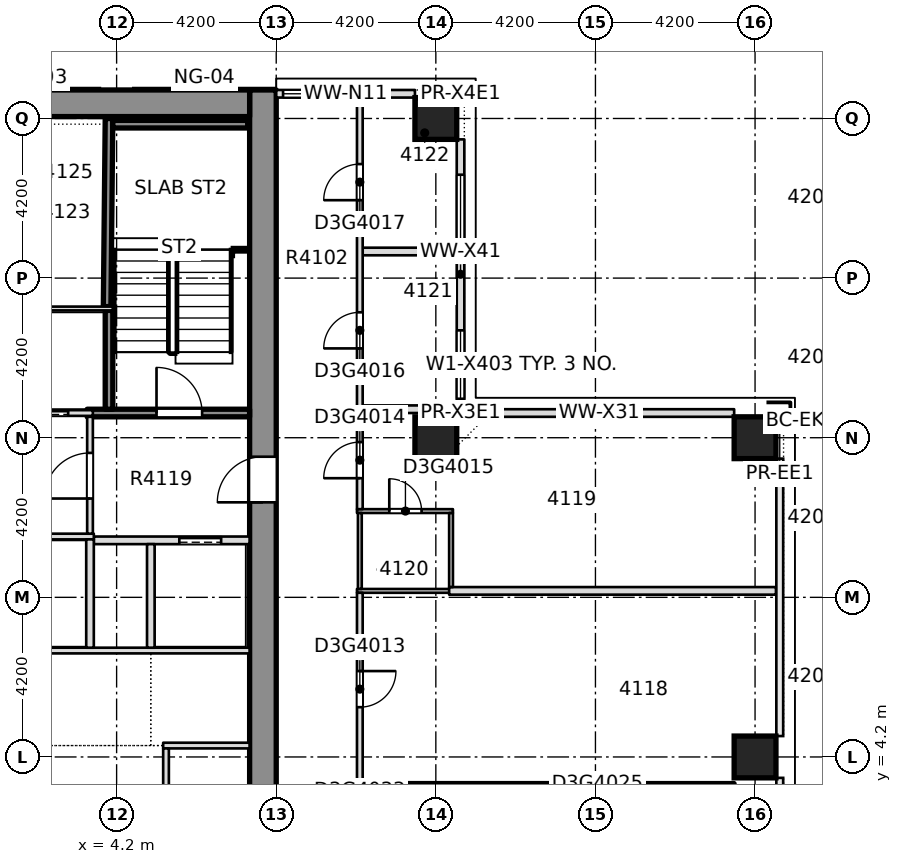
"""IFC4 building model, lengths in metres.
Left out: names, types, materials, properties, quantities, classifications, styles, units other than length and angle.
Written with IfcOpenShell. Run it as: python <this file> out.ifc"""

import sys

from ifc_helpers import new_model, si_unit, direction, frame, frame_2d, origin, origin_2d, place, context, subcontext, project, spatial, rectangle, extrude, element, fill, save


model = new_model("IFC4")
c1 = context("Model", 3, precision=1e-05, world=origin(), true_north=direction((0.0, 1.0)))
c2 = subcontext(c1, "Body", "Model", "MODEL_VIEW")
j1 = project(units=[si_unit("LENGTHUNIT", "METRE"), si_unit("PLANEANGLEUNIT", "RADIAN")], contexts=[c1])
p1 = place(None, origin())
s1 = spatial("IfcSite", under=j1, at=p1, CompositionType="ELEMENT")
p2 = place(p1, origin())
s2 = spatial("IfcBuilding", under=s1, at=p2, CompositionType="ELEMENT")
p3 = place(p2, frame((0.0, 0.0, 160.7)))
s3 = spatial("IfcBuildingStorey", under=s2, at=p3, CompositionType="ELEMENT", Elevation=160.7)
p4 = place(p3, frame((8.05, -8.4, -0.4), z_axis=(0.0, 0.0, 1.0), x_axis=(0.0, 1.0, 0.0)))
e1 = element("IfcWall", 1, at=p4, inside=s3, PredefinedType="SOLIDWALL", context=c2, shape_type="SweptSolid", body=[
    extrude(rectangle(XDim=30.15, YDim=0.7, at=frame_2d((15.075, 0.0))), origin(), (0.0, 0.0, 1.0), 3.45),
])
p5 = place(p4, frame((19.3, 0.0, 0.4)))
e2 = element("IfcOpeningElement", 2, at=p5, cuts=e1, PredefinedType="OPENING", context=c2, shape_type="SweptSolid", body=[
    extrude(rectangle(XDim=1.2, YDim=2.1, at=frame_2d((0.6, 1.05))), frame((0.0, 0.36, 0.0), z_axis=(0.0, -1.0, 0.0), x_axis=(1.0, 0.0, 0.0)), (0.0, 0.0, 1.0), 0.72),
])
p6 = place(p3, frame((-7.7, 21.4, -0.4), z_axis=(0.0, 0.0, 1.0), x_axis=(1.0, 0.0, 0.0)))
e3 = element("IfcWall", 3, at=p6, inside=s3, PredefinedType="SHEAR", context=c2, shape_type="SweptSolid", body=[
    extrude(rectangle(XDim=15.4, YDim=0.7, at=frame_2d((7.7, 0.0))), origin(), (0.0, 0.0, 1.0), 3.45),
])
for number, where, z_axis, x_axis in (
    (4, (21.0, 4.2, -0.4), (0.0, 0.0, 1.0), (1.0, 0.0, 0.0)),
    (5, (12.6, 12.6, -0.4), (0.0, 0.0, 1.0), (1.0, 0.0, 0.0)),
    (6, (21.0, 12.6, -0.4), (0.0, 0.0, 1.0), (1.0, 0.0, 0.0)),
    (7, (12.6, 21.0, -0.4), (0.0, 0.0, 1.0), (1.0, 0.0, 0.0)),
):
    element("IfcColumn", number, at=place(p3, frame(where, z_axis=z_axis, x_axis=x_axis)), inside=s3, PredefinedType="COLUMN", context=c2, shape_type="SweptSolid", body=[
        extrude(rectangle(XDim=1.1, YDim=1.1, at=origin_2d()), origin(), (0.0, 0.0, 1.0), 3.45),
    ])
p7 = place(p3, frame((10.525, 8.57, 0.0), z_axis=(0.0, 0.0, 1.0), x_axis=(1.0, 0.0, 0.0)))
e8 = element("IfcWall", 8, at=p7, inside=s3, PredefinedType="PARTITIONING", context=c2, shape_type="SweptSolid", body=[
    extrude(rectangle(XDim=2.525, YDim=0.1, at=frame_2d((1.263, 0.0))), origin(), (0.0, 0.0, 1.0), 3.05),
])
p8 = place(p3, frame((12.95, 8.57, 0.0), z_axis=(0.0, 0.0, 1.0), x_axis=(1.0, 0.0, 0.0)))
e9 = element("IfcWall", 9, at=p8, inside=s3, PredefinedType="PARTITIONING", context=c2, shape_type="SweptSolid", body=[
    extrude(rectangle(XDim=8.6, YDim=0.2, at=frame_2d((4.3, 0.0))), origin(), (0.0, 0.0, 1.0), 3.05),
])
p9 = place(p3, frame((10.525, 10.67, 0.0), z_axis=(0.0, 0.0, 1.0), x_axis=(1.0, 0.0, 0.0)))
e10 = element("IfcWall", 10, at=p9, inside=s3, PredefinedType="PARTITIONING", context=c2, shape_type="SweptSolid", body=[
    extrude(rectangle(XDim=2.525, YDim=0.1, at=frame_2d((1.263, 0.0))), origin(), (0.0, 0.0, 1.0), 3.05),
])
p10 = place(p9, frame((0.85, 0.0, 0.0)))
e11 = element("IfcOpeningElement", 11, at=p10, cuts=e10, PredefinedType="OPENING", context=c2, shape_type="SweptSolid", body=[
    extrude(rectangle(XDim=0.85, YDim=2.1, at=frame_2d((0.425, 1.05))), frame((0.0, 0.06, 0.0), z_axis=(0.0, -1.0, 0.0), x_axis=(1.0, 0.0, 0.0)), (0.0, 0.0, 1.0), 0.12),
])
for number, where, z_axis, x_axis in (
    (12, (10.675, 13.35, 0.0), (0.0, 0.0, 1.0), (1.0, 0.0, 0.0)),
    (13, (10.675, 17.5, 0.0), (0.0, 0.0, 1.0), (1.0, 0.0, 0.0)),
):
    element("IfcWall", number, at=place(p3, frame(where, z_axis=z_axis, x_axis=x_axis)), inside=s3, PredefinedType="PARTITIONING", context=c2, shape_type="SweptSolid", body=[
        extrude(rectangle(XDim=2.475, YDim=0.2, at=frame_2d((1.237, 0.0))), origin(), (0.0, 0.0, 1.0), 3.05),
    ])
p11 = place(p3, frame((10.6, -6.225, 0.0), z_axis=(0.0, 0.0, 1.0), x_axis=(0.0, 1.0, 0.0)))
e14 = element("IfcWall", 14, at=p11, inside=s3, PredefinedType="PARTITIONING", context=c2, shape_type="SweptSolid", body=[
    extrude(rectangle(XDim=14.745, YDim=0.15, at=frame_2d((7.373, 0.0))), origin(), (0.0, 0.0, 1.0), 3.05),
])
p12 = place(p11, frame((11.735, 0.0, 0.0)))
e15 = element("IfcOpeningElement", 15, at=p12, cuts=e14, PredefinedType="OPENING", context=c2, shape_type="SweptSolid", body=[
    extrude(rectangle(XDim=0.95, YDim=2.1, at=frame_2d((0.475, 1.05))), frame((0.0, 0.085, 0.0), z_axis=(0.0, -1.0, 0.0), x_axis=(1.0, 0.0, 0.0)), (0.0, 0.0, 1.0), 0.17),
])
p13 = place(p11, frame((5.675, 0.0, 0.0)))
e16 = element("IfcOpeningElement", 16, at=p13, cuts=e14, PredefinedType="OPENING", context=c2, shape_type="SweptSolid", body=[
    extrude(rectangle(XDim=1.1, YDim=2.1, at=frame_2d((0.55, 1.05))), frame((0.0, 0.085, 0.0), z_axis=(0.0, -1.0, 0.0), x_axis=(1.0, 0.0, 0.0)), (0.0, 0.0, 1.0), 0.17),
])
p14 = place(p11, frame((7.925, 0.0, 0.0)))
e17 = element("IfcOpeningElement", 17, at=p14, cuts=e14, PredefinedType="OPENING", context=c2, shape_type="SweptSolid", body=[
    extrude(rectangle(XDim=1.0, YDim=2.1, at=frame_2d((0.5, 1.05))), frame((0.0, 0.085, 0.0), z_axis=(0.0, -1.0, 0.0), x_axis=(1.0, 0.0, 0.0)), (0.0, 0.0, 1.0), 0.17),
])
p15 = place(p3, frame((10.6, 8.62, 0.0), z_axis=(0.0, 0.0, 1.0), x_axis=(0.0, 1.0, 0.0)))
e18 = element("IfcWall", 18, at=p15, inside=s3, PredefinedType="PARTITIONING", context=c2, shape_type="SweptSolid", body=[
    extrude(rectangle(XDim=2.0, YDim=0.1, at=frame_2d((1.0, 0.0))), origin(), (0.0, 0.0, 1.0), 3.05),
])
p16 = place(p3, frame((10.6, 10.72, 0.0), z_axis=(0.0, 0.0, 1.0), x_axis=(0.0, 1.0, 0.0)))
e19 = element("IfcWall", 19, at=p16, inside=s3, PredefinedType="PARTITIONING", context=c2, shape_type="SweptSolid", body=[
    extrude(rectangle(XDim=10.83, YDim=0.15, at=frame_2d((5.415, 0.0))), origin(), (0.0, 0.0, 1.0), 3.05),
])
p17 = place(p16, frame((0.815, 0.0, 0.0)))
e20 = element("IfcOpeningElement", 20, at=p17, cuts=e19, PredefinedType="OPENING", context=c2, shape_type="SweptSolid", body=[
    extrude(rectangle(XDim=0.95, YDim=2.1, at=frame_2d((0.475, 1.05))), frame((0.0, 0.085, 0.0), z_axis=(0.0, -1.0, 0.0), x_axis=(1.0, 0.0, 0.0)), (0.0, 0.0, 1.0), 0.17),
])
p18 = place(p16, frame((4.23, 0.0, 0.0)))
e21 = element("IfcOpeningElement", 21, at=p18, cuts=e19, PredefinedType="OPENING", context=c2, shape_type="SweptSolid", body=[
    extrude(rectangle(XDim=0.95, YDim=2.1, at=frame_2d((0.475, 1.05))), frame((0.0, 0.085, 0.0), z_axis=(0.0, -1.0, 0.0), x_axis=(1.0, 0.0, 0.0)), (0.0, 0.0, 1.0), 0.17),
])
p19 = place(p16, frame((8.13, 0.0, 0.0)))
e22 = element("IfcOpeningElement", 22, at=p19, cuts=e19, PredefinedType="OPENING", context=c2, shape_type="SweptSolid", body=[
    extrude(rectangle(XDim=0.95, YDim=2.1, at=frame_2d((0.475, 1.05))), frame((0.0, 0.085, 0.0), z_axis=(0.0, -1.0, 0.0), x_axis=(1.0, 0.0, 0.0)), (0.0, 0.0, 1.0), 0.17),
])
p20 = place(p3, frame((13.0, 8.67, 0.0), z_axis=(0.0, 0.0, 1.0), x_axis=(0.0, 1.0, 0.0)))
e23 = element("IfcWall", 23, at=p20, inside=s3, PredefinedType="PARTITIONING", context=c2, shape_type="SweptSolid", body=[
    extrude(rectangle(XDim=1.95, YDim=0.1, at=frame_2d((0.975, 0.0))), origin(), (0.0, 0.0, 1.0), 3.05),
])
p21 = place(p3, frame((20.45, 13.25, 0.0), z_axis=(0.0, 0.0, 1.0), x_axis=(-1.0, 0.0, 0.0)))
e24 = element("IfcWall", 24, at=p21, inside=s3, PredefinedType="STANDARD", context=c2, shape_type="SweptSolid", body=[
    extrude(rectangle(XDim=7.1, YDim=0.2, at=frame_2d((3.55, 0.0))), origin(), (0.0, 0.0, 1.0), 3.05),
])
p22 = place(p3, frame((13.25, 13.35, 0.0), z_axis=(0.0, 0.0, 1.0), x_axis=(0.0, 1.0, 0.0)))
e25 = element("IfcWall", 25, at=p22, inside=s3, PredefinedType="STANDARD", context=c2, shape_type="SweptSolid", body=[
    extrude(rectangle(XDim=7.1, YDim=0.2, at=frame_2d((3.55, 0.0))), origin(), (0.0, 0.0, 1.0), 3.05),
])
p23 = place(p22, frame((0.275, 0.0, 0.2)))
e26 = element("IfcOpeningElement", 26, at=p23, cuts=e25, PredefinedType="OPENING", context=c2, shape_type="SweptSolid", body=[
    extrude(rectangle(XDim=1.8, YDim=2.65, at=frame_2d((0.9, 1.325))), frame((0.0, 0.11, 0.0), z_axis=(0.0, -1.0, 0.0), x_axis=(1.0, 0.0, 0.0)), (0.0, 0.0, 1.0), 0.22),
])
p24 = place(p22, frame((4.37, 0.0, 0.2)))
e27 = element("IfcOpeningElement", 27, at=p24, cuts=e25, PredefinedType="OPENING", context=c2, shape_type="SweptSolid", body=[
    extrude(rectangle(XDim=1.8, YDim=2.65, at=frame_2d((0.9, 1.325))), frame((0.0, 0.11, 0.0), z_axis=(0.0, -1.0, 0.0), x_axis=(1.0, 0.0, 0.0)), (0.0, 0.0, 1.0), 0.22),
])
p25 = place(p3, frame((12.05, 21.65, 0.0), z_axis=(0.0, 0.0, 1.0), x_axis=(-1.0, 0.0, 0.0)))
e28 = element("IfcWall", 28, at=p25, inside=s3, PredefinedType="STANDARD", context=c2, shape_type="SweptSolid", body=[
    extrude(rectangle(XDim=3.65, YDim=0.2, at=frame_2d((1.825, 0.0))), origin(), (0.0, 0.0, 1.0), 3.05),
])
p26 = place(p25, frame((1.67, 0.0, 0.2)))
e29 = element("IfcOpeningElement", 29, at=p26, cuts=e28, PredefinedType="OPENING", context=c2, shape_type="SweptSolid", body=[
    extrude(rectangle(XDim=1.8, YDim=2.65, at=frame_2d((0.9, 1.325))), frame((0.0, 0.11, 0.0), z_axis=(0.0, -1.0, 0.0), x_axis=(1.0, 0.0, 0.0)), (0.0, 0.0, 1.0), 0.22),
])
p27 = place(p3, frame((5.425, 4.5, 0.0), z_axis=(0.0, 0.0, 1.0), x_axis=(1.0, 0.0, 0.0)))
e30 = element("IfcWall", 30, at=p27, inside=s3, PredefinedType="PARTITIONING", context=c2, shape_type="SweptSolid", body=[
    extrude(rectangle(XDim=2.274, YDim=0.15, at=frame_2d((1.137, 0.0))), origin(), (0.0, 0.0, 1.0), 3.05),
])
p28 = place(p3, frame((-7.699, 7.0, 0.0), z_axis=(0.0, 0.0, 1.0), x_axis=(1.0, 0.0, 0.0)))
e31 = element("IfcWall", 31, at=p28, inside=s3, PredefinedType="PARTITIONING", context=c2, shape_type="SweptSolid", body=[
    extrude(rectangle(XDim=15.398, YDim=0.15, at=frame_2d((7.699, 0.0))), origin(), (0.0, 0.0, 1.0), 3.05),
])
p29 = place(p28, frame((6.999, 0.0, 0.0)))
e32 = element("IfcOpeningElement", 32, at=p29, cuts=e31, PredefinedType="OPENING", context=c2, shape_type="SweptSolid", body=[
    extrude(rectangle(XDim=1.4, YDim=2.1, at=frame_2d((0.7, 1.05))), frame((0.0, 0.085, 0.0), z_axis=(0.0, -1.0, 0.0), x_axis=(1.0, 0.0, 0.0)), (0.0, 0.0, 1.0), 0.17),
])
p30 = place(p3, frame((3.6, 9.9, 0.0), z_axis=(0.0, 0.0, 1.0), x_axis=(1.0, 0.0, 0.0)))
e33 = element("IfcWall", 33, at=p30, inside=s3, PredefinedType="PARTITIONING", context=c2, shape_type="SweptSolid", body=[
    extrude(rectangle(XDim=4.099, YDim=0.2, at=frame_2d((2.049, 0.0))), origin(), (0.0, 0.0, 1.0), 3.05),
])
p31 = place(p30, frame((2.25, 0.0, 0.0)))
e34 = element("IfcOpeningElement", 34, at=p31, cuts=e33, PredefinedType="OPENING", context=c2, shape_type="SweptSolid", body=[
    extrude(rectangle(XDim=1.1, YDim=2.1, at=frame_2d((0.55, 1.05))), frame((0.0, 0.11, 0.0), z_axis=(0.0, -1.0, 0.0), x_axis=(1.0, 0.0, 0.0)), (0.0, 0.0, 1.0), 0.22),
])
p32 = place(p3, frame((-3.6, 10.0, 0.0), z_axis=(0.0, 0.0, 1.0), x_axis=(1.0, 0.0, 0.0)))
e35 = element("IfcWall", 35, at=p32, inside=s3, PredefinedType="PARTITIONING", context=c2, shape_type="SweptSolid", body=[
    extrude(rectangle(XDim=7.2, YDim=0.15, at=frame_2d((3.6, 0.0))), origin(), (0.0, 0.0, 1.0), 3.05),
])
p33 = place(p32, frame((2.9, 0.0, 0.0)))
e36 = element("IfcOpeningElement", 36, at=p33, cuts=e35, PredefinedType="OPENING", context=c2, shape_type="SweptSolid", body=[
    extrude(rectangle(XDim=1.4, YDim=2.1, at=frame_2d((0.7, 1.05))), frame((0.0, 0.085, 0.0), z_axis=(0.0, -1.0, 0.0), x_axis=(1.0, 0.0, 0.0)), (0.0, 0.0, 1.0), 0.17),
])
p34 = place(p3, frame((-3.575, 13.25, 0.0), z_axis=(0.0, 0.0, 1.0), x_axis=(1.0, 0.0, 0.0)))
e37 = element("IfcWall", 37, at=p34, inside=s3, PredefinedType="PARTITIONING", context=c2, shape_type="SweptSolid", body=[
    extrude(rectangle(XDim=7.15, YDim=0.15, at=frame_2d((3.575, 0.0))), origin(), (0.0, 0.0, 1.0), 3.05),
])
p35 = place(p34, frame((0.6, 0.0, 0.0)))
e38 = element("IfcOpeningElement", 38, at=p35, cuts=e37, PredefinedType="OPENING", context=c2, shape_type="SweptSolid", body=[
    extrude(rectangle(XDim=1.2, YDim=2.1, at=frame_2d((0.6, 1.05))), frame((0.0, 0.085, 0.0), z_axis=(0.0, -1.0, 0.0), x_axis=(1.0, 0.0, 0.0)), (0.0, 0.0, 1.0), 0.17),
])
p36 = place(p34, frame((5.4, 0.0, 0.0)))
e39 = element("IfcOpeningElement", 39, at=p36, cuts=e37, PredefinedType="OPENING", context=c2, shape_type="SweptSolid", body=[
    extrude(rectangle(XDim=1.1, YDim=2.1, at=frame_2d((0.55, 1.05))), frame((0.0, 0.085, 0.0), z_axis=(0.0, -1.0, 0.0), x_axis=(1.0, 0.0, 0.0)), (0.0, 0.0, 1.0), 0.17),
])
p37 = place(p34, frame((2.975, 0.0, 0.0)))
e40 = element("IfcOpeningElement", 40, at=p37, cuts=e37, PredefinedType="OPENING", context=c2, shape_type="SweptSolid", body=[
    extrude(rectangle(XDim=1.2, YDim=2.1, at=frame_2d((0.6, 1.05))), frame((0.0, 0.085, 0.0), z_axis=(0.0, -1.0, 0.0), x_axis=(1.0, 0.0, 0.0)), (0.0, 0.0, 1.0), 0.17),
])
p38 = place(p3, frame((3.425, 13.25, 0.0), z_axis=(0.0, 0.0, 1.0), x_axis=(1.0, 0.0, 0.0)))
e41 = element("IfcWall", 41, at=p38, inside=s3, PredefinedType="SOLIDWALL", context=c2, shape_type="SweptSolid", body=[
    extrude(rectangle(XDim=4.274, YDim=0.2, at=frame_2d((2.137, 0.0))), origin(), (0.0, 0.0, 1.0), 3.05),
])
p39 = place(p38, frame((1.825, 0.0, 0.0)))
e42 = element("IfcOpeningElement", 42, at=p39, cuts=e41, PredefinedType="OPENING", context=c2, shape_type="SweptSolid", body=[
    extrude(rectangle(XDim=1.2, YDim=2.1, at=frame_2d((0.6, 1.05))), frame((0.0, 0.11, 0.0), z_axis=(0.0, -1.0, 0.0), x_axis=(1.0, 0.0, 0.0)), (0.0, 0.0, 1.0), 0.22),
])
p40 = place(p3, frame((0.65, 16.0, 0.0), z_axis=(0.0, 0.0, 1.0), x_axis=(1.0, 0.0, 0.0)))
e43 = element("IfcWall", 43, at=p40, inside=s3, PredefinedType="PARTITIONING", context=c2, shape_type="SweptSolid", body=[
    extrude(rectangle(XDim=3.45, YDim=0.1, at=frame_2d((1.725, 0.0))), origin(), (0.0, 0.0, 1.0), 3.05),
])
p41 = place(p3, frame((3.5, 7.075, 0.0), z_axis=(0.0, 0.0, 1.0), x_axis=(0.0, 1.0, 0.0)))
e44 = element("IfcWall", 44, at=p41, inside=s3, PredefinedType="PARTITIONING", context=c2, shape_type="SweptSolid", body=[
    extrude(rectangle(XDim=2.85, YDim=0.2, at=frame_2d((1.425, 0.0))), origin(), (0.0, 0.0, 1.0), 3.05),
])
p42 = place(p3, frame((3.5, 10.075, 0.0), z_axis=(0.0, 0.0, 1.0), x_axis=(0.0, 1.0, 0.0)))
e45 = element("IfcWall", 45, at=p42, inside=s3, PredefinedType="PARTITIONING", context=c2, shape_type="SweptSolid", body=[
    extrude(rectangle(XDim=3.075, YDim=0.15, at=frame_2d((1.538, 0.0))), origin(), (0.0, 0.0, 1.0), 3.05),
])
p43 = place(p42, frame((0.925, 0.0, 0.0)))
e46 = element("IfcOpeningElement", 46, at=p43, cuts=e45, PredefinedType="OPENING", context=c2, shape_type="SweptSolid", body=[
    extrude(rectangle(XDim=1.2, YDim=2.1, at=frame_2d((0.6, 1.05))), frame((0.0, 0.085, 0.0), z_axis=(0.0, -1.0, 0.0), x_axis=(1.0, 0.0, 0.0)), (0.0, 0.0, 1.0), 0.17),
])
p44 = place(p3, frame((4.0, 13.35, 0.0), z_axis=(0.0, 0.0, 1.0), x_axis=(0.0, 1.0, 0.0)))
e47 = element("IfcWall", 47, at=p44, inside=s3, PredefinedType="SOLIDWALL", context=c2, shape_type="SweptSolid", body=[
    extrude(rectangle(XDim=2.6, YDim=0.2, at=frame_2d((1.3, 0.0))), origin(), (0.0, 0.0, 1.0), 3.05),
])
p45 = place(p3, frame((3.95, 16.05, 0.0), z_axis=(0.0, 0.0, 1.0), x_axis=(0.010112452169, 0.999948867848, 0.0)))
e48 = element("IfcWall", 48, at=p45, inside=s3, PredefinedType="SOLIDWALL", context=c2, shape_type="SweptSolid", body=[
    extrude(rectangle(XDim=4.949, YDim=0.2, at=frame_2d((2.475, 0.0))), origin(), (0.0, 0.0, 1.0), 3.05),
])
p46 = place(p3, frame((5.1, 7.075, 0.0), z_axis=(0.0, 0.0, 1.0), x_axis=(0.0, 1.0, 0.0)))
e49 = element("IfcWall", 49, at=p46, inside=s3, PredefinedType="PARTITIONING", context=c2, shape_type="SweptSolid", body=[
    extrude(rectangle(XDim=2.725, YDim=0.2, at=frame_2d((1.363, 0.0))), origin(), (0.0, 0.0, 1.0), 3.05),
])
p47 = place(p3, frame((5.5, -7.699, 0.0), z_axis=(0.0, 0.0, 1.0), x_axis=(0.0, 1.0, 0.0)))
e50 = element("IfcWall", 50, at=p47, inside=s3, PredefinedType="PARTITIONING", context=c2, shape_type="SweptSolid", body=[
    extrude(rectangle(XDim=12.124, YDim=0.15, at=frame_2d((6.062, 0.0))), origin(), (0.0, 0.0, 1.0), 3.05),
])
p48 = place(p47, frame((5.724, 0.0, 0.0)))
e51 = element("IfcOpeningElement", 51, at=p48, cuts=e50, PredefinedType="OPENING", context=c2, shape_type="SweptSolid", body=[
    extrude(rectangle(XDim=0.95, YDim=2.1, at=frame_2d((0.475, 1.05))), frame((0.0, 0.085, 0.0), z_axis=(0.0, -1.0, 0.0), x_axis=(1.0, 0.0, 0.0)), (0.0, 0.0, 1.0), 0.17),
])
p49 = place(p3, frame((4.1, 20.85, 0.0), z_axis=(0.0, 0.0, 1.0), x_axis=(1.0, 0.0, 0.0)))
e52 = element("IfcWall", 52, at=p49, inside=s3, PredefinedType="SOLIDWALL", context=c2, shape_type="SweptSolid", body=[
    extrude(rectangle(XDim=3.55, YDim=0.2, at=frame_2d((1.775, 0.0))), origin(), (0.0, 0.0, 1.0), 3.05),
])
p50 = place(p12, origin())
e53 = element("IfcDoor", 53, at=p50, inside=s3, OperationType="SINGLE_SWING_LEFT", PredefinedType="DOOR", context=c2, shape_type="SweptSolid", body=[
    extrude(rectangle(XDim=0.95, YDim=2.1, at=frame_2d((0.475, 1.05))), frame((0.0, 0.025, 0.0), z_axis=(0.0, -1.0, 0.0), x_axis=(1.0, 0.0, 0.0)), (0.0, 0.0, 1.0), 0.05),
])
fill(e15, e53)
p51 = place(p17, origin())
e54 = element("IfcDoor", 54, at=p51, inside=s3, OperationType="SINGLE_SWING_RIGHT", PredefinedType="DOOR", context=c2, shape_type="SweptSolid", body=[
    extrude(rectangle(XDim=0.95, YDim=2.1, at=frame_2d((0.475, 1.05))), frame((0.0, 0.025, 0.0), z_axis=(0.0, -1.0, 0.0), x_axis=(1.0, 0.0, 0.0)), (0.0, 0.0, 1.0), 0.05),
])
fill(e20, e54)
p52 = place(p10, origin())
e55 = element("IfcDoor", 55, at=p52, inside=s3, OperationType="SINGLE_SWING_RIGHT", PredefinedType="DOOR", context=c2, shape_type="SweptSolid", body=[
    extrude(rectangle(XDim=0.85, YDim=2.1, at=frame_2d((0.425, 1.05))), frame((0.0, 0.025, 0.0), z_axis=(0.0, -1.0, 0.0), x_axis=(1.0, 0.0, 0.0)), (0.0, 0.0, 1.0), 0.05),
])
fill(e11, e55)
p53 = place(p18, origin())
e56 = element("IfcDoor", 56, at=p53, inside=s3, OperationType="SINGLE_SWING_RIGHT", PredefinedType="DOOR", context=c2, shape_type="SweptSolid", body=[
    extrude(rectangle(XDim=0.95, YDim=2.1, at=frame_2d((0.475, 1.05))), frame((0.0, 0.025, 0.0), z_axis=(0.0, -1.0, 0.0), x_axis=(1.0, 0.0, 0.0)), (0.0, 0.0, 1.0), 0.05),
])
fill(e21, e56)
p54 = place(p19, origin())
e57 = element("IfcDoor", 57, at=p54, inside=s3, OperationType="SINGLE_SWING_LEFT", PredefinedType="DOOR", context=c2, shape_type="SweptSolid", body=[
    extrude(rectangle(XDim=0.95, YDim=2.1, at=frame_2d((0.475, 1.05))), frame((0.0, 0.025, 0.0), z_axis=(0.0, -1.0, 0.0), x_axis=(1.0, 0.0, 0.0)), (0.0, 0.0, 1.0), 0.05),
])
fill(e22, e57)
p55 = place(p23, origin())
e58 = element("IfcWindow", 58, at=p55, inside=s3, PartitioningType="SINGLE_PANEL", PredefinedType="WINDOW", context=c2, shape_type="SweptSolid", body=[
    extrude(rectangle(XDim=1.8, YDim=2.65, at=frame_2d((0.9, 1.325))), frame((0.0, 0.03, 0.0), z_axis=(0.0, -1.0, 0.0), x_axis=(1.0, 0.0, 0.0)), (0.0, 0.0, 1.0), 0.06),
])
fill(e26, e58)
p56 = place(p24, origin())
e59 = element("IfcWindow", 59, at=p56, inside=s3, PartitioningType="SINGLE_PANEL", PredefinedType="WINDOW", context=c2, shape_type="SweptSolid", body=[
    extrude(rectangle(XDim=1.8, YDim=2.65, at=frame_2d((0.9, 1.325))), frame((0.0, 0.03, 0.0), z_axis=(0.0, -1.0, 0.0), x_axis=(1.0, 0.0, 0.0)), (0.0, 0.0, 1.0), 0.06),
])
fill(e27, e59)
p57 = place(p26, origin())
e60 = element("IfcWindow", 60, at=p57, inside=s3, PartitioningType="SINGLE_PANEL", PredefinedType="WINDOW", context=c2, shape_type="SweptSolid", body=[
    extrude(rectangle(XDim=1.8, YDim=2.65, at=frame_2d((0.9, 1.325))), frame((0.0, 0.03, 0.0), z_axis=(0.0, -1.0, 0.0), x_axis=(1.0, 0.0, 0.0)), (0.0, 0.0, 1.0), 0.06),
])
fill(e29, e60)
p58 = place(p39, origin())
e61 = element("IfcDoor", 61, at=p58, inside=s3, OperationType="SINGLE_SWING_RIGHT", PredefinedType="DOOR", context=c2, shape_type="SweptSolid", body=[
    extrude(rectangle(XDim=1.2, YDim=2.1, at=frame_2d((0.6, 1.05))), frame((0.0, 0.025, 0.0), z_axis=(0.0, -1.0, 0.0), x_axis=(1.0, 0.0, 0.0)), (0.0, 0.0, 1.0), 0.05),
])
fill(e42, e61)
p59 = place(p31, origin())
e62 = element("IfcDoor", 62, at=p59, inside=s3, OperationType="SLIDING_TO_LEFT", PredefinedType="DOOR", context=c2, shape_type="SweptSolid", body=[
    extrude(rectangle(XDim=1.1, YDim=2.1, at=frame_2d((0.55, 1.05))), frame((0.0, 0.025, 0.0), z_axis=(0.0, -1.0, 0.0), x_axis=(1.0, 0.0, 0.0)), (0.0, 0.0, 1.0), 0.05),
])
fill(e34, e62)
p60 = place(p36, origin())
e63 = element("IfcDoor", 63, at=p60, inside=s3, OperationType="SLIDING_TO_LEFT", PredefinedType="DOOR", context=c2, shape_type="SweptSolid", body=[
    extrude(rectangle(XDim=1.1, YDim=2.1, at=frame_2d((0.55, 1.05))), frame((0.0, 0.025, 0.0), z_axis=(0.0, -1.0, 0.0), x_axis=(1.0, 0.0, 0.0)), (0.0, 0.0, 1.0), 0.05),
])
fill(e39, e63)
p61 = place(p43, origin())
e64 = element("IfcDoor", 64, at=p61, inside=s3, OperationType="SINGLE_SWING_LEFT", PredefinedType="DOOR", context=c2, shape_type="SweptSolid", body=[
    extrude(rectangle(XDim=1.2, YDim=2.1, at=frame_2d((0.6, 1.05))), frame((0.0, 0.025, 0.0), z_axis=(0.0, -1.0, 0.0), x_axis=(1.0, 0.0, 0.0)), (0.0, 0.0, 1.0), 0.05),
])
fill(e46, e64)
p62 = place(p5, origin())
e65 = element("IfcDoor", 65, at=p62, inside=s3, OperationType="SINGLE_SWING_LEFT", PredefinedType="DOOR", context=c2, shape_type="SweptSolid", body=[
    extrude(rectangle(XDim=1.2, YDim=2.1, at=frame_2d((0.6, 1.05))), frame((0.0, 0.025, 0.0), z_axis=(0.0, -1.0, 0.0), x_axis=(1.0, 0.0, 0.0)), (0.0, 0.0, 1.0), 0.05),
])
fill(e2, e65)
save(model, sys.argv[1])
